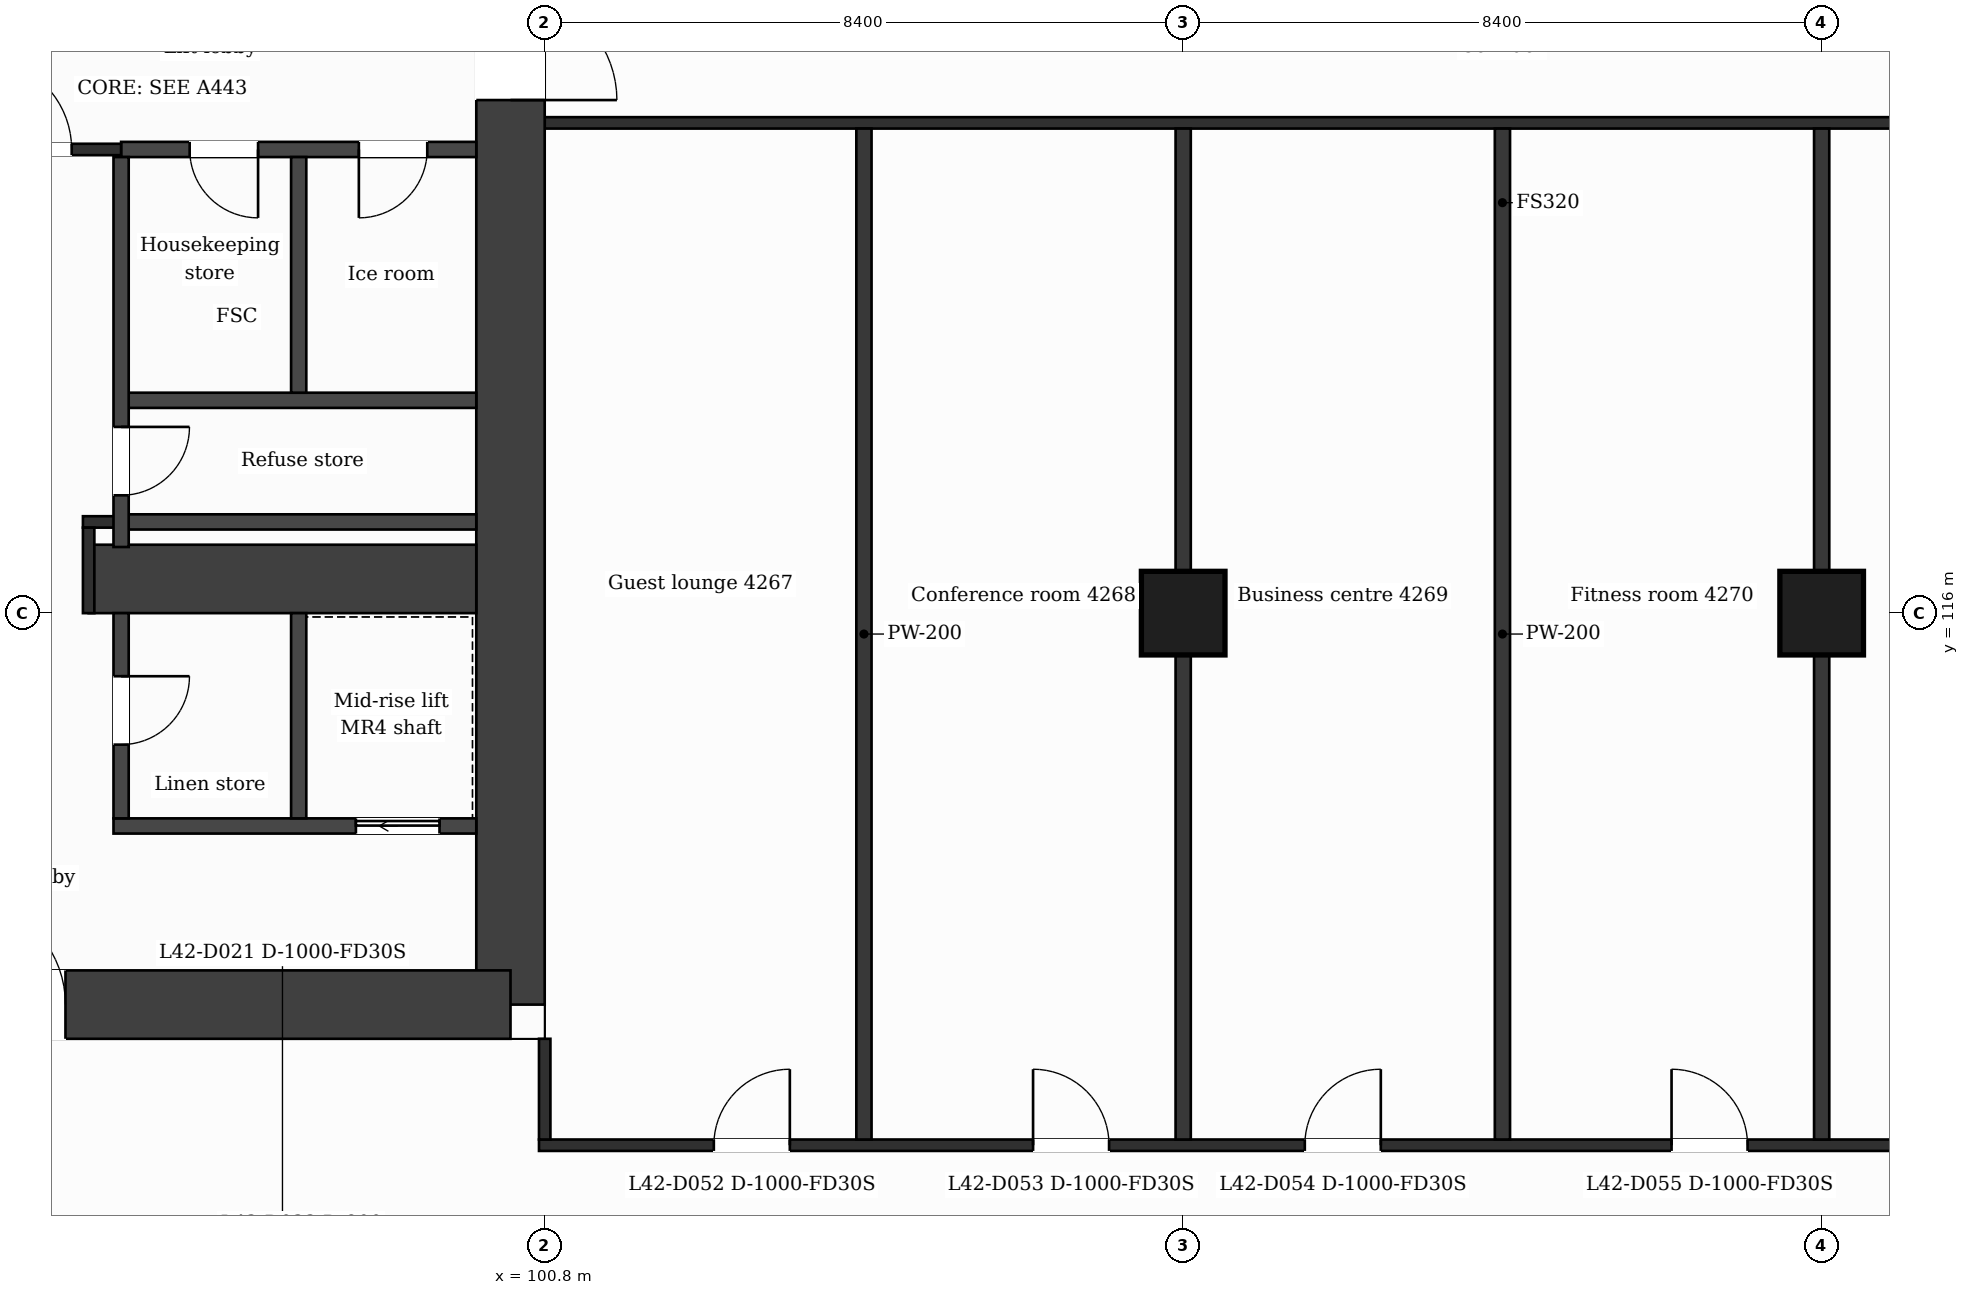
"""IFC4 building model, lengths in metres.
Left out: names, types, materials, properties, quantities, classifications, styles, units other than length and angle.
Written with IfcOpenShell. Run it as: python <this file> out.ifc"""

import sys

from ifc_helpers import new_model, si_unit, direction, frame, frame_2d, origin, origin_2d, place, context, subcontext, project, spatial, rectangle, extrude, element, fill, save


model = new_model("IFC4")
c1 = context("Model", 3, precision=1e-05, world=origin(), true_north=direction((0.0, 1.0)))
c2 = subcontext(c1, "Body", "Model", "MODEL_VIEW")
j1 = project(units=[si_unit("LENGTHUNIT", "METRE"), si_unit("PLANEANGLEUNIT", "RADIAN")], contexts=[c1])
p1 = place(None, origin())
s1 = spatial("IfcSite", under=j1, at=p1, CompositionType="ELEMENT")
p2 = place(p1, origin())
s2 = spatial("IfcBuilding", under=s1, at=p2, CompositionType="ELEMENT")
p3 = place(p2, frame((0.0, 0.0, 177.4)))
s3 = spatial("IfcBuildingStorey", under=s2, at=p3, CompositionType="ELEMENT", Elevation=177.4)
p4 = place(p3, frame((100.35, 131.95, 0.0), z_axis=(0.0, 0.0, 1.0), x_axis=(0.0, -1.0, 0.0)))
e1 = element("IfcWall", 1, at=p4, inside=s3, PredefinedType="SHEAR", context=c2, shape_type="SweptSolid", body=[
    extrude(rectangle(XDim=21.1, YDim=0.9, at=frame_2d((10.55, 0.0))), origin(), (0.0, 0.0, 1.0), 3.7),
])
p5 = place(p4, frame((7.8, 0.0, 0.0)))
e2 = element("IfcOpeningElement", 2, at=p5, cuts=e1, PredefinedType="OPENING", context=c2, shape_type="SweptSolid", body=[
    extrude(rectangle(XDim=1.4, YDim=2.1, at=frame_2d((0.7, 1.05))), frame((0.0, 0.46, 0.0), z_axis=(0.0, -1.0, 0.0), x_axis=(1.0, 0.0, 0.0)), (0.0, 0.0, 1.0), 0.92),
])
p6 = place(p3, frame((100.35, 110.85, 0.0), z_axis=(0.0, 0.0, 1.0), x_axis=(-1.0, 0.0, 0.0)))
e3 = element("IfcWall", 3, at=p6, inside=s3, PredefinedType="SHEAR", context=c2, shape_type="SweptSolid", body=[
    extrude(rectangle(XDim=14.166, YDim=0.9, at=frame_2d((7.083, 0.0))), origin(), (0.0, 0.0, 1.0), 3.7),
])
p7 = place(p6, frame((5.855, 0.0, 0.0)))
e4 = element("IfcOpeningElement", 4, at=p7, cuts=e3, PredefinedType="OPENING", context=c2, shape_type="SweptSolid", body=[
    extrude(rectangle(XDim=1.4, YDim=2.1, at=frame_2d((0.7, 1.05))), frame((0.0, 0.46, 0.0), z_axis=(0.0, -1.0, 0.0), x_axis=(1.0, 0.0, 0.0)), (0.0, 0.0, 1.0), 0.92),
])
p8 = place(p3, frame((94.8, 116.45, 0.0), z_axis=(0.0, 0.0, 1.0), x_axis=(1.0, 0.0, 0.0)))
e5 = element("IfcWall", 5, at=p8, inside=s3, PredefinedType="SHEAR", context=c2, shape_type="SweptSolid", body=[
    extrude(rectangle(XDim=5.1, YDim=0.9, at=frame_2d((2.55, 0.0))), origin(), (0.0, 0.0, 1.0), 3.7),
])
for number, where, z_axis, x_axis in (
    (6, (109.2, 116.0, 0.0), (0.0, 0.0, 1.0), (1.0, 0.0, 0.0)),
    (7, (117.6, 116.0, 0.0), (0.0, 0.0, 1.0), (1.0, 0.0, 0.0)),
):
    element("IfcColumn", number, at=place(p3, frame(where, z_axis=z_axis, x_axis=x_axis)), inside=s3, PredefinedType="COLUMN", context=c2, shape_type="SweptSolid", body=[
        extrude(rectangle(XDim=1.1, YDim=1.1, at=origin_2d()), origin(), (0.0, 0.0, 1.0), 3.7),
    ])
p9 = place(p3, frame((100.725, 109.0, 0.0), z_axis=(0.0, 0.0, 1.0), x_axis=(1.0, 0.0, 0.0)))
e8 = element("IfcWall", 8, at=p9, inside=s3, PredefinedType="PARTITIONING", context=c2, shape_type="SweptSolid", body=[
    extrude(rectangle(XDim=25.35, YDim=0.15, at=frame_2d((12.675, 0.0))), origin(), (0.0, 0.0, 1.0), 3.38),
])
p10 = place(p9, frame((2.3, 0.0, 0.0)))
e9 = element("IfcOpeningElement", 9, at=p10, cuts=e8, PredefinedType="OPENING", context=c2, shape_type="SweptSolid", body=[
    extrude(rectangle(XDim=1.0, YDim=2.1, at=frame_2d((0.5, 1.05))), frame((0.0, 0.085, 0.0), z_axis=(0.0, -1.0, 0.0), x_axis=(1.0, 0.0, 0.0)), (0.0, 0.0, 1.0), 0.17),
])
p11 = place(p9, frame((6.5, 0.0, 0.0)))
e10 = element("IfcOpeningElement", 10, at=p11, cuts=e8, PredefinedType="OPENING", context=c2, shape_type="SweptSolid", body=[
    extrude(rectangle(XDim=1.0, YDim=2.1, at=frame_2d((0.5, 1.05))), frame((0.0, 0.085, 0.0), z_axis=(0.0, -1.0, 0.0), x_axis=(1.0, 0.0, 0.0)), (0.0, 0.0, 1.0), 0.17),
])
p12 = place(p9, frame((10.075, 0.0, 0.0)))
e11 = element("IfcOpeningElement", 11, at=p12, cuts=e8, PredefinedType="OPENING", context=c2, shape_type="SweptSolid", body=[
    extrude(rectangle(XDim=1.0, YDim=2.1, at=frame_2d((0.5, 1.05))), frame((0.0, 0.085, 0.0), z_axis=(0.0, -1.0, 0.0), x_axis=(1.0, 0.0, 0.0)), (0.0, 0.0, 1.0), 0.17),
])
p13 = place(p9, frame((14.9, 0.0, 0.0)))
e12 = element("IfcOpeningElement", 12, at=p13, cuts=e8, PredefinedType="OPENING", context=c2, shape_type="SweptSolid", body=[
    extrude(rectangle(XDim=1.0, YDim=2.1, at=frame_2d((0.5, 1.05))), frame((0.0, 0.085, 0.0), z_axis=(0.0, -1.0, 0.0), x_axis=(1.0, 0.0, 0.0)), (0.0, 0.0, 1.0), 0.17),
])
p14 = place(p9, frame((22.25, 0.0, 0.0)))
e13 = element("IfcOpeningElement", 13, at=p14, cuts=e8, PredefinedType="OPENING", context=c2, shape_type="SweptSolid", body=[
    extrude(rectangle(XDim=1.0, YDim=2.1, at=frame_2d((0.5, 1.05))), frame((0.0, 0.085, 0.0), z_axis=(0.0, -1.0, 0.0), x_axis=(1.0, 0.0, 0.0)), (0.0, 0.0, 1.0), 0.17),
])
p15 = place(p3, frame((95.127, 113.2, 0.0), z_axis=(0.0, 0.0, 1.0), x_axis=(1.0, 0.0, 0.0)))
e14 = element("IfcWall", 14, at=p15, inside=s3, PredefinedType="PARTITIONING", context=c2, shape_type="SweptSolid", body=[
    extrude(rectangle(XDim=4.773, YDim=0.2, at=frame_2d((2.386, 0.0))), origin(), (0.0, 0.0, 1.0), 3.38),
])
p16 = place(p15, frame((3.189, 0.0, 0.0)))
e15 = element("IfcOpeningElement", 15, at=p16, cuts=e14, PredefinedType="OPENING", context=c2, shape_type="SweptSolid", body=[
    extrude(rectangle(XDim=1.1, YDim=2.1, at=frame_2d((0.55, 1.05))), frame((0.0, 0.11, 0.0), z_axis=(0.0, -1.0, 0.0), x_axis=(1.0, 0.0, 0.0)), (0.0, 0.0, 1.0), 0.22),
])
p17 = place(p3, frame((95.227, 117.2, 0.0), z_axis=(0.0, 0.0, 1.0), x_axis=(1.0, 0.0, 0.0)))
e16 = element("IfcWall", 16, at=p17, inside=s3, PredefinedType="PARTITIONING", context=c2, shape_type="SweptSolid", body=[
    extrude(rectangle(XDim=4.673, YDim=0.2, at=frame_2d((2.336, 0.0))), origin(), (0.0, 0.0, 1.0), 3.38),
])
p18 = place(p3, frame((94.725, 117.2, 0.0), z_axis=(0.0, 0.0, 1.0), x_axis=(1.0, 0.0, 0.0)))
e17 = element("IfcWall", 17, at=p18, inside=s3, PredefinedType="PARTITIONING", context=c2, shape_type="SweptSolid", body=[
    extrude(rectangle(XDim=0.502, YDim=0.15, at=frame_2d((0.251, 0.0))), origin(), (0.0, 0.0, 1.0), 3.38),
])
p19 = place(p3, frame((95.227, 118.8, 0.0), z_axis=(0.0, 0.0, 1.0), x_axis=(1.0, 0.0, 0.0)))
e18 = element("IfcWall", 18, at=p19, inside=s3, PredefinedType="PARTITIONING", context=c2, shape_type="SweptSolid", body=[
    extrude(rectangle(XDim=4.673, YDim=0.2, at=frame_2d((2.336, 0.0))), origin(), (0.0, 0.0, 1.0), 3.38),
])
p20 = place(p3, frame((95.227, 122.1, 0.0), z_axis=(0.0, 0.0, 1.0), x_axis=(1.0, 0.0, 0.0)))
e19 = element("IfcWall", 19, at=p20, inside=s3, PredefinedType="PARTITIONING", context=c2, shape_type="SweptSolid", body=[
    extrude(rectangle(XDim=4.673, YDim=0.2, at=frame_2d((2.336, 0.0))), origin(), (0.0, 0.0, 1.0), 3.38),
])
p21 = place(p20, frame((0.902, 0.0, 0.0)))
e20 = element("IfcOpeningElement", 20, at=p21, cuts=e19, PredefinedType="OPENING", context=c2, shape_type="SweptSolid", body=[
    extrude(rectangle(XDim=0.9, YDim=2.1, at=frame_2d((0.45, 1.05))), frame((0.0, 0.11, 0.0), z_axis=(0.0, -1.0, 0.0), x_axis=(1.0, 0.0, 0.0)), (0.0, 0.0, 1.0), 0.22),
])
p22 = place(p20, frame((3.128, 0.0, 0.0)))
e21 = element("IfcOpeningElement", 21, at=p22, cuts=e19, PredefinedType="OPENING", context=c2, shape_type="SweptSolid", body=[
    extrude(rectangle(XDim=0.9, YDim=2.1, at=frame_2d((0.45, 1.05))), frame((0.0, 0.11, 0.0), z_axis=(0.0, -1.0, 0.0), x_axis=(1.0, 0.0, 0.0)), (0.0, 0.0, 1.0), 0.22),
])
p23 = place(p3, frame((92.827, 122.1, 0.0), z_axis=(0.0, 0.0, 1.0), x_axis=(1.0, 0.0, 0.0)))
e22 = element("IfcWall", 22, at=p23, inside=s3, PredefinedType="PARTITIONING", context=c2, shape_type="SweptSolid", body=[
    extrude(rectangle(XDim=2.4, YDim=0.15, at=frame_2d((1.2, 0.0))), origin(), (0.0, 0.0, 1.0), 3.38),
])
p24 = place(p23, frame((0.55, 0.0, 0.0)))
e23 = element("IfcOpeningElement", 23, at=p24, cuts=e22, PredefinedType="OPENING", context=c2, shape_type="SweptSolid", body=[
    extrude(rectangle(XDim=1.2, YDim=2.1, at=frame_2d((0.6, 1.05))), frame((0.0, 0.085, 0.0), z_axis=(0.0, -1.0, 0.0), x_axis=(1.0, 0.0, 0.0)), (0.0, 0.0, 1.0), 0.17),
])
p25 = place(p3, frame((100.8, 122.45, 0.0), z_axis=(0.0, 0.0, 1.0), x_axis=(1.0, 0.0, 0.0)))
e24 = element("IfcWall", 24, at=p25, inside=s3, PredefinedType="PARTITIONING", context=c2, shape_type="SweptSolid", body=[
    extrude(rectangle(XDim=25.2, YDim=0.15, at=frame_2d((12.6, 0.0))), origin(), (0.0, 0.0, 1.0), 3.38),
])
p26 = place(p3, frame((94.8, 116.0, 0.0), z_axis=(0.0, 0.0, 1.0), x_axis=(0.0, 1.0, 0.0)))
e25 = element("IfcWall", 25, at=p26, inside=s3, PredefinedType="PARTITIONING", context=c2, shape_type="SweptSolid", body=[
    extrude(rectangle(XDim=1.125, YDim=0.15, at=frame_2d((0.562, 0.0))), origin(), (0.0, 0.0, 1.0), 3.38),
])
p27 = place(p3, frame((95.227, 113.3, 0.0), z_axis=(0.0, 0.0, 1.0), x_axis=(0.0, 1.0, 0.0)))
e26 = element("IfcWall", 26, at=p27, inside=s3, PredefinedType="PARTITIONING", context=c2, shape_type="SweptSolid", body=[
    extrude(rectangle(XDim=2.7, YDim=0.2, at=frame_2d((1.35, 0.0))), origin(), (0.0, 0.0, 1.0), 3.38),
])
p28 = place(p27, frame((0.97, 0.0, 0.0)))
e27 = element("IfcOpeningElement", 27, at=p28, cuts=e26, PredefinedType="OPENING", context=c2, shape_type="SweptSolid", body=[
    extrude(rectangle(XDim=0.9, YDim=2.1, at=frame_2d((0.45, 1.05))), frame((0.0, 0.11, 0.0), z_axis=(0.0, -1.0, 0.0), x_axis=(1.0, 0.0, 0.0)), (0.0, 0.0, 1.0), 0.22),
])
p29 = place(p3, frame((95.227, 116.87, 0.0), z_axis=(0.0, 0.0, 1.0), x_axis=(0.0, 1.0, 0.0)))
e28 = element("IfcWall", 28, at=p29, inside=s3, PredefinedType="PARTITIONING", context=c2, shape_type="SweptSolid", body=[
    extrude(rectangle(XDim=5.13, YDim=0.2, at=frame_2d((2.565, 0.0))), origin(), (0.0, 0.0, 1.0), 3.38),
])
p30 = place(p29, frame((0.68, 0.0, 0.0)))
e29 = element("IfcOpeningElement", 29, at=p30, cuts=e28, PredefinedType="OPENING", context=c2, shape_type="SweptSolid", body=[
    extrude(rectangle(XDim=0.9, YDim=2.1, at=frame_2d((0.45, 1.05))), frame((0.0, 0.11, 0.0), z_axis=(0.0, -1.0, 0.0), x_axis=(1.0, 0.0, 0.0)), (0.0, 0.0, 1.0), 0.22),
])
p31 = place(p3, frame((97.563, 113.3, 0.0), z_axis=(0.0, 0.0, 1.0), x_axis=(0.0, 1.0, 0.0)))
e30 = element("IfcWall", 30, at=p31, inside=s3, PredefinedType="PARTITIONING", context=c2, shape_type="SweptSolid", body=[
    extrude(rectangle(XDim=2.7, YDim=0.2, at=frame_2d((1.35, 0.0))), origin(), (0.0, 0.0, 1.0), 3.38),
])
p32 = place(p3, frame((97.563, 118.9, 0.0), z_axis=(0.0, 0.0, 1.0), x_axis=(0.0, 1.0, 0.0)))
e31 = element("IfcWall", 31, at=p32, inside=s3, PredefinedType="PARTITIONING", context=c2, shape_type="SweptSolid", body=[
    extrude(rectangle(XDim=3.1, YDim=0.2, at=frame_2d((1.55, 0.0))), origin(), (0.0, 0.0, 1.0), 3.38),
])
p33 = place(p3, frame((100.8, 109.075, 0.0), z_axis=(0.0, 0.0, 1.0), x_axis=(0.0, 1.0, 0.0)))
e32 = element("IfcWall", 32, at=p33, inside=s3, PredefinedType="PARTITIONING", context=c2, shape_type="SweptSolid", body=[
    extrude(rectangle(XDim=1.325, YDim=0.15, at=frame_2d((0.663, 0.0))), origin(), (0.0, 0.0, 1.0), 3.38),
])
for number, where, z_axis, x_axis in (
    (33, (105.0, 109.075, 0.0), (0.0, 0.0, 1.0), (0.0, 1.0, 0.0)),
    (34, (109.2, 109.075, 0.0), (0.0, 0.0, 1.0), (0.0, 1.0, 0.0)),
    (35, (113.4, 109.075, 0.0), (0.0, 0.0, 1.0), (0.0, 1.0, 0.0)),
    (36, (117.6, 109.075, 0.0), (0.0, 0.0, 1.0), (0.0, 1.0, 0.0)),
):
    element("IfcWall", number, at=place(p3, frame(where, z_axis=z_axis, x_axis=x_axis)), inside=s3, PredefinedType="PARTITIONING", context=c2, shape_type="SweptSolid", body=[
        extrude(rectangle(XDim=13.3, YDim=0.2, at=frame_2d((6.65, 0.0))), origin(), (0.0, 0.0, 1.0), 3.38),
    ])
p34 = place(p24, origin())
e37 = element("IfcDoor", 37, at=p34, inside=s3, OperationType="SINGLE_SWING_LEFT", PredefinedType="DOOR", context=c2, shape_type="SweptSolid", body=[
    extrude(rectangle(XDim=1.2, YDim=2.1, at=frame_2d((0.6, 1.05))), frame((0.0, 0.025, 0.0), z_axis=(0.0, -1.0, 0.0), x_axis=(1.0, 0.0, 0.0)), (0.0, 0.0, 1.0), 0.05),
])
fill(e23, e37)
p35 = place(p21, origin())
e38 = element("IfcDoor", 38, at=p35, inside=s3, OperationType="SINGLE_SWING_RIGHT", PredefinedType="DOOR", context=c2, shape_type="SweptSolid", body=[
    extrude(rectangle(XDim=0.9, YDim=2.1, at=frame_2d((0.45, 1.05))), frame((0.0, 0.025, 0.0), z_axis=(0.0, -1.0, 0.0), x_axis=(1.0, 0.0, 0.0)), (0.0, 0.0, 1.0), 0.05),
])
fill(e20, e38)
p36 = place(p22, origin())
e39 = element("IfcDoor", 39, at=p36, inside=s3, OperationType="SINGLE_SWING_LEFT", PredefinedType="DOOR", context=c2, shape_type="SweptSolid", body=[
    extrude(rectangle(XDim=0.9, YDim=2.1, at=frame_2d((0.45, 1.05))), frame((0.0, 0.025, 0.0), z_axis=(0.0, -1.0, 0.0), x_axis=(1.0, 0.0, 0.0)), (0.0, 0.0, 1.0), 0.05),
])
fill(e21, e39)
p37 = place(p30, origin())
e40 = element("IfcDoor", 40, at=p37, inside=s3, OperationType="SINGLE_SWING_RIGHT", PredefinedType="DOOR", context=c2, shape_type="SweptSolid", body=[
    extrude(rectangle(XDim=0.9, YDim=2.1, at=frame_2d((0.45, 1.05))), frame((0.0, 0.025, 0.0), z_axis=(0.0, -1.0, 0.0), x_axis=(1.0, 0.0, 0.0)), (0.0, 0.0, 1.0), 0.05),
])
fill(e29, e40)
p38 = place(p16, origin())
e41 = element("IfcDoor", 41, at=p38, inside=s3, OperationType="SLIDING_TO_LEFT", PredefinedType="DOOR", context=c2, shape_type="SweptSolid", body=[
    extrude(rectangle(XDim=1.1, YDim=2.1, at=frame_2d((0.55, 1.05))), frame((0.0, 0.025, 0.0), z_axis=(0.0, -1.0, 0.0), x_axis=(1.0, 0.0, 0.0)), (0.0, 0.0, 1.0), 0.05),
])
fill(e15, e41)
p39 = place(p28, origin())
e42 = element("IfcDoor", 42, at=p39, inside=s3, OperationType="SINGLE_SWING_RIGHT", PredefinedType="DOOR", context=c2, shape_type="SweptSolid", body=[
    extrude(rectangle(XDim=0.9, YDim=2.1, at=frame_2d((0.45, 1.05))), frame((0.0, 0.025, 0.0), z_axis=(0.0, -1.0, 0.0), x_axis=(1.0, 0.0, 0.0)), (0.0, 0.0, 1.0), 0.05),
])
fill(e27, e42)
p40 = place(p10, origin())
e43 = element("IfcDoor", 43, at=p40, inside=s3, OperationType="SINGLE_SWING_RIGHT", PredefinedType="DOOR", context=c2, shape_type="SweptSolid", body=[
    extrude(rectangle(XDim=1.0, YDim=2.1, at=frame_2d((0.5, 1.05))), frame((0.0, 0.025, 0.0), z_axis=(0.0, -1.0, 0.0), x_axis=(1.0, 0.0, 0.0)), (0.0, 0.0, 1.0), 0.05),
])
fill(e9, e43)
p41 = place(p11, origin())
e44 = element("IfcDoor", 44, at=p41, inside=s3, OperationType="SINGLE_SWING_LEFT", PredefinedType="DOOR", context=c2, shape_type="SweptSolid", body=[
    extrude(rectangle(XDim=1.0, YDim=2.1, at=frame_2d((0.5, 1.05))), frame((0.0, 0.025, 0.0), z_axis=(0.0, -1.0, 0.0), x_axis=(1.0, 0.0, 0.0)), (0.0, 0.0, 1.0), 0.05),
])
fill(e10, e44)
p42 = place(p12, origin())
e45 = element("IfcDoor", 45, at=p42, inside=s3, OperationType="SINGLE_SWING_RIGHT", PredefinedType="DOOR", context=c2, shape_type="SweptSolid", body=[
    extrude(rectangle(XDim=1.0, YDim=2.1, at=frame_2d((0.5, 1.05))), frame((0.0, 0.025, 0.0), z_axis=(0.0, -1.0, 0.0), x_axis=(1.0, 0.0, 0.0)), (0.0, 0.0, 1.0), 0.05),
])
fill(e11, e45)
p43 = place(p13, origin())
e46 = element("IfcDoor", 46, at=p43, inside=s3, OperationType="SINGLE_SWING_LEFT", PredefinedType="DOOR", context=c2, shape_type="SweptSolid", body=[
    extrude(rectangle(XDim=1.0, YDim=2.1, at=frame_2d((0.5, 1.05))), frame((0.0, 0.025, 0.0), z_axis=(0.0, -1.0, 0.0), x_axis=(1.0, 0.0, 0.0)), (0.0, 0.0, 1.0), 0.05),
])
fill(e12, e46)
p44 = place(p7, origin())
e47 = element("IfcDoor", 47, at=p44, inside=s3, OperationType="SINGLE_SWING_RIGHT", PredefinedType="DOOR", context=c2, shape_type="SweptSolid", body=[
    extrude(rectangle(XDim=1.4, YDim=2.1, at=frame_2d((0.7, 1.05))), frame((0.0, 0.025, 0.0), z_axis=(0.0, -1.0, 0.0), x_axis=(1.0, 0.0, 0.0)), (0.0, 0.0, 1.0), 0.05),
])
fill(e4, e47)
p45 = place(p5, origin())
e48 = element("IfcDoor", 48, at=p45, inside=s3, OperationType="SINGLE_SWING_RIGHT", PredefinedType="DOOR", context=c2, shape_type="SweptSolid", body=[
    extrude(rectangle(XDim=1.4, YDim=2.1, at=frame_2d((0.7, 1.05))), frame((0.0, 0.025, 0.0), z_axis=(0.0, -1.0, 0.0), x_axis=(1.0, 0.0, 0.0)), (0.0, 0.0, 1.0), 0.05),
])
fill(e2, e48)
save(model, sys.argv[1])
